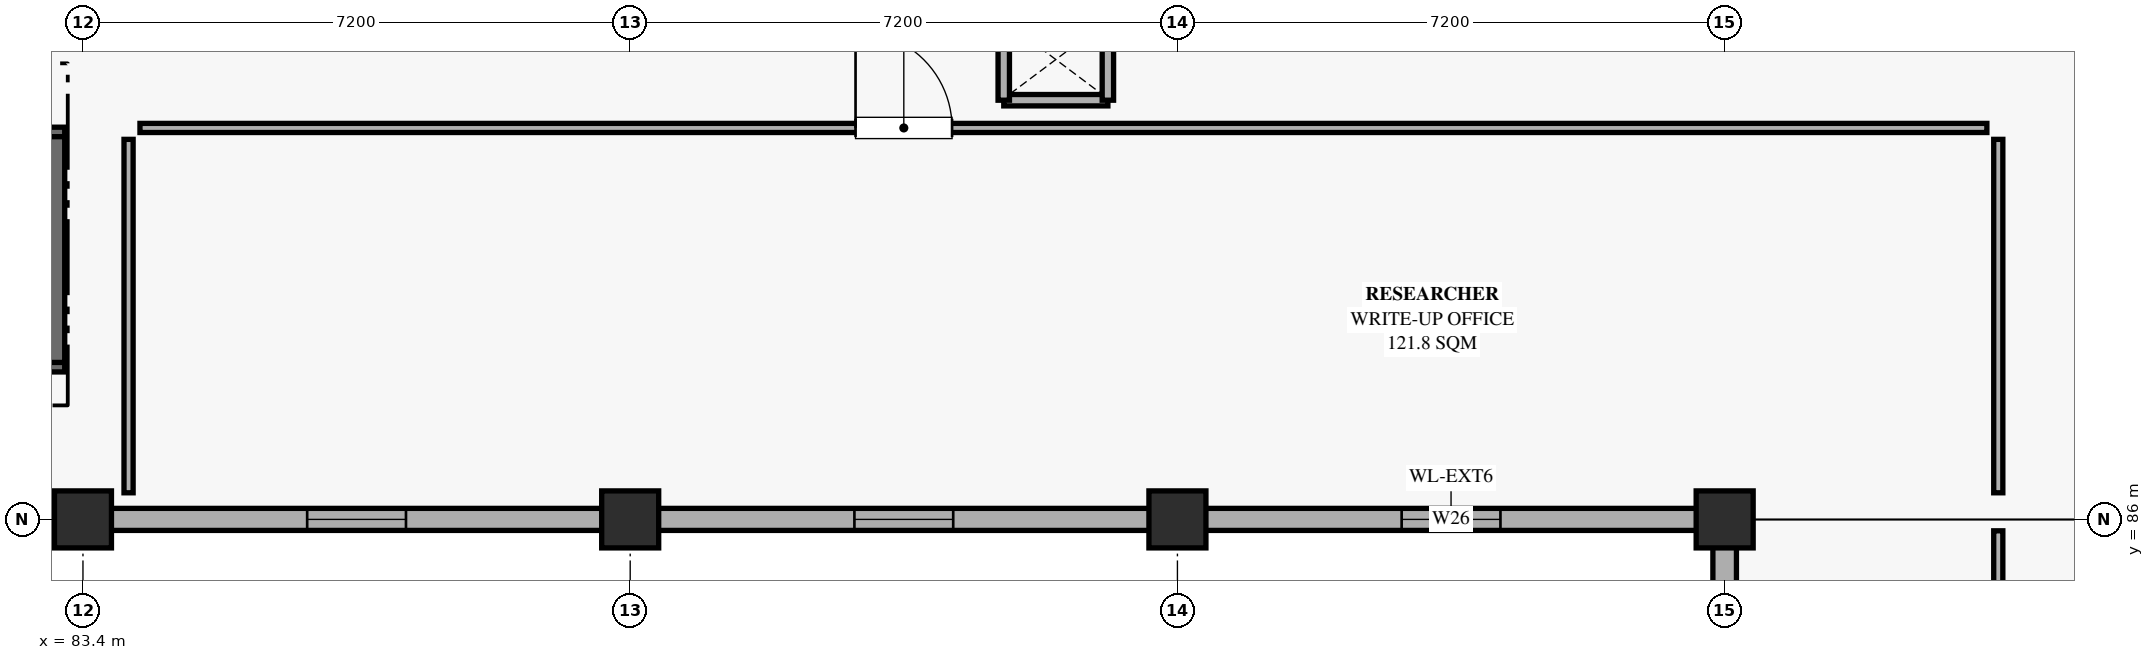
"""IFC4 building model, lengths in metres.
Left out: names, types, materials, properties, quantities, classifications, styles, units other than length and angle.
Written with IfcOpenShell. Run it as: python <this file> out.ifc"""

import sys

from ifc_helpers import new_model, si_unit, direction, frame, frame_2d, origin, origin_2d, place, context, subcontext, project, spatial, rectangle, extrude, element, fill, save


model = new_model("IFC4")
c1 = context("Model", 3, precision=1e-05, world=origin(), true_north=direction((0.0, 1.0)))
c2 = subcontext(c1, "Body", "Model", "MODEL_VIEW")
j1 = project(units=[si_unit("LENGTHUNIT", "METRE"), si_unit("PLANEANGLEUNIT", "RADIAN")], contexts=[c1])
p1 = place(None, origin())
s1 = spatial("IfcSite", under=j1, at=p1, CompositionType="ELEMENT")
p2 = place(p1, origin())
s2 = spatial("IfcBuilding", under=s1, at=p2, CompositionType="ELEMENT")
p3 = place(p2, frame((0.0, 0.0, 24.3)))
s3 = spatial("IfcBuildingStorey", under=s2, at=p3, CompositionType="ELEMENT", Elevation=24.3)
for number, where, z_axis, x_axis in (
    (1, (83.4, 86.0, 0.0), (0.0, 0.0, 1.0), (1.0, 0.0, 0.0)),
    (2, (90.6, 86.0, 0.0), (0.0, 0.0, 1.0), (1.0, 0.0, 0.0)),
    (3, (97.8, 86.0, 0.0), (0.0, 0.0, 1.0), (1.0, 0.0, 0.0)),
    (4, (105.0, 86.0, 0.0), (0.0, 0.0, 1.0), (1.0, 0.0, 0.0)),
):
    element("IfcColumn", number, at=place(p3, frame(where, z_axis=z_axis, x_axis=x_axis)), inside=s3, PredefinedType="COLUMN", context=c2, shape_type="SweptSolid", body=[
        extrude(rectangle(XDim=0.75, YDim=0.75, at=origin_2d()), origin(), (0.0, 0.0, 1.0), 4.5),
    ])
p4 = place(p3, frame((105.0, 79.16, 0.0), z_axis=(0.0, 0.0, 1.0), x_axis=(0.0, 1.0, 0.0)))
e5 = element("IfcWall", 5, at=p4, inside=s3, PredefinedType="SOLIDWALL", context=c2, shape_type="SweptSolid", body=[
    extrude(rectangle(XDim=6.48, YDim=0.31, at=frame_2d((3.24, 0.0))), origin(), (0.0, 0.0, 1.0), 3.0),
])
p5 = place(p4, frame((2.29, 0.0, 0.85)))
e6 = element("IfcOpeningElement", 6, at=p5, cuts=e5, PredefinedType="OPENING", context=c2, shape_type="SweptSolid", body=[
    extrude(rectangle(XDim=1.9, YDim=2.0, at=frame_2d((0.95, 1.0))), frame((0.0, 0.165, 0.0), z_axis=(0.0, -1.0, 0.0), x_axis=(1.0, 0.0, 0.0)), (0.0, 0.0, 1.0), 0.33),
])
p6 = place(p3, frame((104.64, 86.0, 0.0), z_axis=(0.0, 0.0, 1.0), x_axis=(-1.0, 0.0, 0.0)))
e7 = element("IfcWall", 7, at=p6, inside=s3, PredefinedType="SOLIDWALL", context=c2, shape_type="SweptSolid", body=[
    extrude(rectangle(XDim=6.48, YDim=0.29, at=frame_2d((3.24, 0.0))), origin(), (0.0, 0.0, 1.0), 3.0),
])
p7 = place(p6, frame((2.59, 0.0, 0.85)))
e8 = element("IfcOpeningElement", 8, at=p7, cuts=e7, PredefinedType="OPENING", context=c2, shape_type="SweptSolid", body=[
    extrude(rectangle(XDim=1.3, YDim=1.9, at=frame_2d((0.65, 0.95))), frame((0.0, 0.155, 0.0), z_axis=(0.0, -1.0, 0.0), x_axis=(1.0, 0.0, 0.0)), (0.0, 0.0, 1.0), 0.31),
])
p8 = place(p3, frame((97.44, 86.0, 0.0), z_axis=(0.0, 0.0, 1.0), x_axis=(-1.0, 0.0, 0.0)))
e9 = element("IfcWall", 9, at=p8, inside=s3, PredefinedType="SOLIDWALL", context=c2, shape_type="SweptSolid", body=[
    extrude(rectangle(XDim=6.48, YDim=0.29, at=frame_2d((3.24, 0.0))), origin(), (0.0, 0.0, 1.0), 3.0),
])
p9 = place(p8, frame((2.59, 0.0, 0.85)))
e10 = element("IfcOpeningElement", 10, at=p9, cuts=e9, PredefinedType="OPENING", context=c2, shape_type="SweptSolid", body=[
    extrude(rectangle(XDim=1.3, YDim=1.9, at=frame_2d((0.65, 0.95))), frame((0.0, 0.155, 0.0), z_axis=(0.0, -1.0, 0.0), x_axis=(1.0, 0.0, 0.0)), (0.0, 0.0, 1.0), 0.31),
])
p10 = place(p3, frame((90.24, 86.0, 0.0), z_axis=(0.0, 0.0, 1.0), x_axis=(-1.0, 0.0, 0.0)))
e11 = element("IfcWall", 11, at=p10, inside=s3, PredefinedType="SOLIDWALL", context=c2, shape_type="SweptSolid", body=[
    extrude(rectangle(XDim=6.48, YDim=0.29, at=frame_2d((3.24, 0.0))), origin(), (0.0, 0.0, 1.0), 3.0),
])
p11 = place(p10, frame((2.59, 0.0, 0.85)))
e12 = element("IfcOpeningElement", 12, at=p11, cuts=e11, PredefinedType="OPENING", context=c2, shape_type="SweptSolid", body=[
    extrude(rectangle(XDim=1.3, YDim=1.9, at=frame_2d((0.65, 0.95))), frame((0.0, 0.155, 0.0), z_axis=(0.0, -1.0, 0.0), x_axis=(1.0, 0.0, 0.0)), (0.0, 0.0, 1.0), 0.31),
])
p12 = place(p3, frame((83.04, 86.0, 0.0), z_axis=(0.0, 0.0, 1.0), x_axis=(-1.0, 0.0, 0.0)))
e13 = element("IfcWall", 13, at=p12, inside=s3, PredefinedType="SOLIDWALL", context=c2, shape_type="SweptSolid", body=[
    extrude(rectangle(XDim=6.48, YDim=0.29, at=frame_2d((3.24, 0.0))), origin(), (0.0, 0.0, 1.0), 3.0),
])
p13 = place(p12, frame((2.59, 0.0, 0.85)))
e14 = element("IfcOpeningElement", 14, at=p13, cuts=e13, PredefinedType="OPENING", context=c2, shape_type="SweptSolid", body=[
    extrude(rectangle(XDim=1.3, YDim=1.9, at=frame_2d((0.65, 0.95))), frame((0.0, 0.155, 0.0), z_axis=(0.0, -1.0, 0.0), x_axis=(1.0, 0.0, 0.0)), (0.0, 0.0, 1.0), 0.31),
])
p14 = place(p3, frame((96.885, 91.515, 0.0), z_axis=(0.0, 0.0, 1.0), x_axis=(-1.0, 0.0, 0.0)))
e15 = element("IfcWall", 15, at=p14, inside=s3, PredefinedType="PARTITIONING", context=c2, shape_type="SweptSolid", body=[
    extrude(rectangle(XDim=1.37, YDim=0.15, at=frame_2d((0.685, 0.0))), origin(), (0.0, 0.0, 1.0), 2.98),
])
for number, where, z_axis, x_axis in (
    (16, (95.515, 91.515, 0.0), (0.0, 0.0, 1.0), (0.0, 1.0, 0.0)),
    (17, (96.885, 92.585, 0.0), (0.0, 0.0, 1.0), (0.0, -1.0, 0.0)),
):
    element("IfcWall", number, at=place(p3, frame(where, z_axis=z_axis, x_axis=x_axis)), inside=s3, PredefinedType="PARTITIONING", context=c2, shape_type="SweptSolid", body=[
        extrude(rectangle(XDim=1.07, YDim=0.15, at=frame_2d((0.535, 0.0))), origin(), (0.0, 0.0, 1.0), 2.98),
    ])
p15 = place(p3, frame((83.16, 88.065, 0.0), z_axis=(0.0, 0.0, 1.0), x_axis=(-1.0, 0.0, 0.0)))
e18 = element("IfcWall", 18, at=p15, inside=s3, PredefinedType="SHEAR", context=c2, shape_type="SweptSolid", body=[
    extrude(rectangle(XDim=2.62, YDim=0.25, at=frame_2d((1.31, 0.0))), origin(), (0.0, 0.0, 1.0), 4.23),
])
p16 = place(p3, frame((80.54, 91.035, 0.0), z_axis=(0.0, 0.0, 1.0), x_axis=(1.0, 0.0, 0.0)))
e19 = element("IfcWall", 19, at=p16, inside=s3, PredefinedType="SHEAR", context=c2, shape_type="SweptSolid", body=[
    extrude(rectangle(XDim=2.62, YDim=0.25, at=frame_2d((1.31, 0.0))), origin(), (0.0, 0.0, 1.0), 4.23),
])
p17 = place(p16, frame((0.76, 0.0, 0.0)))
e20 = element("IfcOpeningElement", 20, at=p17, cuts=e19, PredefinedType="OPENING", context=c2, shape_type="SweptSolid", body=[
    extrude(rectangle(XDim=1.1, YDim=2.2, at=frame_2d((0.55, 1.1))), frame((0.0, 0.135, 0.0), z_axis=(0.0, -1.0, 0.0), x_axis=(1.0, 0.0, 0.0)), (0.0, 0.0, 1.0), 0.27),
])
p18 = place(p3, frame((83.035, 91.035, 0.0), z_axis=(0.0, 0.0, 1.0), x_axis=(0.0, -1.0, 0.0)))
e21 = element("IfcWall", 21, at=p18, inside=s3, PredefinedType="SHEAR", context=c2, shape_type="SweptSolid", body=[
    extrude(rectangle(XDim=2.97, YDim=0.25, at=frame_2d((1.485, 0.0))), origin(), (0.0, 0.0, 1.0), 4.23),
])
p19 = place(p3, frame((108.6, 85.85, 0.0), z_axis=(0.0, 0.0, 1.0), x_axis=(0.0, -1.0, 0.0)))
e22 = element("IfcWall", 22, at=p19, inside=s3, PredefinedType="PARTITIONING", context=c2, shape_type="SweptSolid", body=[
    extrude(rectangle(XDim=21.3, YDim=0.12, at=frame_2d((10.65, 0.0))), origin(), (0.0, 0.0, 1.0), 2.98),
])
p20 = place(p19, frame((10.035, 0.0, 0.0)))
e23 = element("IfcOpeningElement", 23, at=p20, cuts=e22, PredefinedType="OPENING", context=c2, shape_type="SweptSolid", body=[
    extrude(rectangle(XDim=1.23, YDim=2.22, at=frame_2d((0.615, 1.11))), frame((0.0, 0.07, 0.0), z_axis=(0.0, -1.0, 0.0), x_axis=(1.0, 0.0, 0.0)), (0.0, 0.0, 1.0), 0.14),
])
p21 = place(p3, frame((84.15, 91.15, 0.0), z_axis=(0.0, 0.0, 1.0), x_axis=(1.0, 0.0, 0.0)))
e24 = element("IfcWall", 24, at=p21, inside=s3, PredefinedType="PARTITIONING", context=c2, shape_type="SweptSolid", body=[
    extrude(rectangle(XDim=24.3, YDim=0.12, at=frame_2d((12.15, 0.0))), origin(), (0.0, 0.0, 1.0), 2.98),
])
p22 = place(p21, frame((9.415, 0.0, 0.0)))
e25 = element("IfcOpeningElement", 25, at=p22, cuts=e24, PredefinedType="OPENING", context=c2, shape_type="SweptSolid", body=[
    extrude(rectangle(XDim=1.27, YDim=2.16, at=frame_2d((0.635, 1.08))), frame((0.0, 0.07, 0.0), z_axis=(0.0, -1.0, 0.0), x_axis=(1.0, 0.0, 0.0)), (0.0, 0.0, 1.0), 0.14),
])
for number, where, z_axis, x_axis in (
    (26, (84.0, 86.35, 0.0), (0.0, 0.0, 1.0), (0.0, 1.0, 0.0)),
    (27, (108.6, 91.0, 0.0), (0.0, 0.0, 1.0), (0.0, -1.0, 0.0)),
):
    element("IfcWall", number, at=place(p3, frame(where, z_axis=z_axis, x_axis=x_axis)), inside=s3, PredefinedType="PARTITIONING", context=c2, shape_type="SweptSolid", body=[
        extrude(rectangle(XDim=4.65, YDim=0.12, at=frame_2d((2.325, 0.0))), origin(), (0.0, 0.0, 1.0), 2.98),
    ])
p23 = place(p7, origin())
e28 = element("IfcWindow", 28, at=p23, inside=s3, PartitioningType="SINGLE_PANEL", PredefinedType="WINDOW", context=c2, shape_type="SweptSolid", body=[
    extrude(rectangle(XDim=1.3, YDim=1.9, at=frame_2d((0.65, 0.95))), frame((0.0, 0.03, 0.0), z_axis=(0.0, -1.0, 0.0), x_axis=(1.0, 0.0, 0.0)), (0.0, 0.0, 1.0), 0.06),
])
fill(e8, e28)
p24 = place(p9, origin())
e29 = element("IfcWindow", 29, at=p24, inside=s3, PartitioningType="SINGLE_PANEL", PredefinedType="WINDOW", context=c2, shape_type="SweptSolid", body=[
    extrude(rectangle(XDim=1.3, YDim=1.9, at=frame_2d((0.65, 0.95))), frame((0.0, 0.03, 0.0), z_axis=(0.0, -1.0, 0.0), x_axis=(1.0, 0.0, 0.0)), (0.0, 0.0, 1.0), 0.06),
])
fill(e10, e29)
p25 = place(p11, origin())
e30 = element("IfcWindow", 30, at=p25, inside=s3, PartitioningType="SINGLE_PANEL", PredefinedType="WINDOW", context=c2, shape_type="SweptSolid", body=[
    extrude(rectangle(XDim=1.3, YDim=1.9, at=frame_2d((0.65, 0.95))), frame((0.0, 0.03, 0.0), z_axis=(0.0, -1.0, 0.0), x_axis=(1.0, 0.0, 0.0)), (0.0, 0.0, 1.0), 0.06),
])
fill(e12, e30)
p26 = place(p22, origin())
e31 = element("IfcDoor", 31, at=p26, inside=s3, OperationType="SINGLE_SWING_LEFT", PredefinedType="DOOR", context=c2, shape_type="SweptSolid", body=[
    extrude(rectangle(XDim=1.27, YDim=2.16, at=frame_2d((0.635, 1.08))), frame((0.0, 0.025, 0.0), z_axis=(0.0, -1.0, 0.0), x_axis=(1.0, 0.0, 0.0)), (0.0, 0.0, 1.0), 0.05),
])
fill(e25, e31)
save(model, sys.argv[1])
